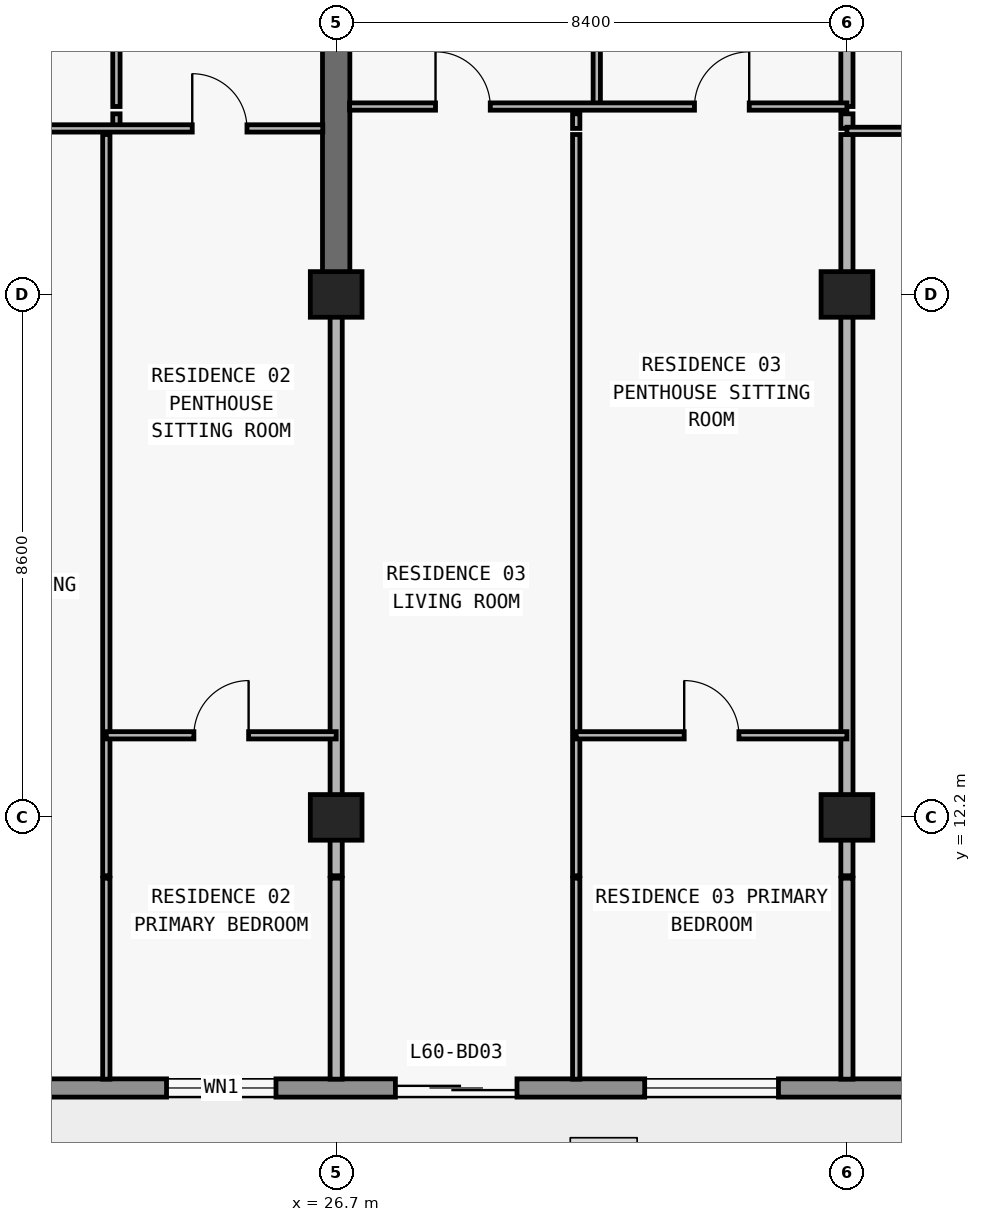
"""IFC4 building model, lengths in metres.
Left out: names, types, materials, properties, quantities, classifications, styles, units other than length and angle.
Written with IfcOpenShell. Run it as: python <this file> out.ifc"""

import sys

from ifc_helpers import new_model, si_unit, direction, frame, frame_2d, origin, origin_2d, place, context, subcontext, project, spatial, rectangle, extrude, element, fill, save


model = new_model("IFC4")
c1 = context("Model", 3, precision=1e-05, world=origin(), true_north=direction((0.0, 1.0)))
c2 = subcontext(c1, "Body", "Model", "MODEL_VIEW")
j1 = project(units=[si_unit("LENGTHUNIT", "METRE"), si_unit("PLANEANGLEUNIT", "RADIAN")], contexts=[c1])
p1 = place(None, origin())
s1 = spatial("IfcSite", under=j1, at=p1, CompositionType="ELEMENT")
p2 = place(p1, origin())
s2 = spatial("IfcBuilding", under=s1, at=p2, CompositionType="ELEMENT")
p3 = place(p2, frame((0.0, 0.0, 214.8)))
s3 = spatial("IfcBuildingStorey", under=s2, at=p3, CompositionType="ELEMENT", Elevation=214.8)
for number, where, z_axis, x_axis in (
    (1, (26.7, 12.2, 0.0), (0.0, 0.0, 1.0), (1.0, 0.0, 0.0)),
    (2, (35.1, 12.2, 0.0), (0.0, 0.0, 1.0), (1.0, 0.0, 0.0)),
    (3, (26.7, 20.8, 0.0), (0.0, 0.0, 1.0), (1.0, 0.0, 0.0)),
    (4, (35.1, 20.8, 0.0), (0.0, 0.0, 1.0), (1.0, 0.0, 0.0)),
):
    element("IfcColumn", number, at=place(p3, frame(where, z_axis=z_axis, x_axis=x_axis)), inside=s3, PredefinedType="COLUMN", context=c2, shape_type="SweptSolid", body=[
        extrude(rectangle(XDim=0.85, YDim=0.75, at=origin_2d()), origin(), (0.0, 0.0, 1.0), 3.05),
    ])
p4 = place(p3, frame((26.7, 20.8, 0.0), z_axis=(0.0, 0.0, 1.0), x_axis=(0.0, 1.0, 0.0)))
e5 = element("IfcWall", 5, at=p4, inside=s3, PredefinedType="SHEAR", context=c2, shape_type="SweptSolid", body=[
    extrude(rectangle(XDim=8.6, YDim=0.45, at=frame_2d((4.3, 0.0))), origin(), (0.0, 0.0, 1.0), 3.05),
])
p5 = place(p3, frame((67.7, 7.75, 0.0), z_axis=(0.0, 0.0, 1.0), x_axis=(-1.0, 0.0, 0.0)))
e6 = element("IfcWall", 6, at=p5, inside=s3, PredefinedType="STANDARD", context=c2, shape_type="SweptSolid", body=[
    extrude(rectangle(XDim=57.6, YDim=0.3, at=frame_2d((28.8, 0.0))), origin(), (0.0, 0.0, 1.0), 3.05),
])
p6 = place(p5, frame((54.673, 0.0, 0.0)))
e7 = element("IfcOpeningElement", 7, at=p6, cuts=e6, PredefinedType="OPENING", context=c2, shape_type="SweptSolid", body=[
    extrude(rectangle(XDim=2.0, YDim=2.3, at=frame_2d((1.0, 1.15))), frame((0.0, 0.16, 0.0), z_axis=(0.0, -1.0, 0.0), x_axis=(1.0, 0.0, 0.0)), (0.0, 0.0, 1.0), 0.32),
])
p7 = place(p5, frame((50.473, 0.0, 0.85)))
e8 = element("IfcOpeningElement", 8, at=p7, cuts=e6, PredefinedType="OPENING", context=c2, shape_type="SweptSolid", body=[
    extrude(rectangle(XDim=2.2, YDim=1.55, at=frame_2d((1.1, 0.775))), frame((0.0, 0.16, 0.0), z_axis=(0.0, -1.0, 0.0), x_axis=(1.0, 0.0, 0.0)), (0.0, 0.0, 1.0), 0.32),
])
p8 = place(p5, frame((46.09, 0.0, 0.0)))
e9 = element("IfcOpeningElement", 9, at=p8, cuts=e6, PredefinedType="OPENING", context=c2, shape_type="SweptSolid", body=[
    extrude(rectangle(XDim=2.0, YDim=2.3, at=frame_2d((1.0, 1.15))), frame((0.0, 0.16, 0.0), z_axis=(0.0, -1.0, 0.0), x_axis=(1.0, 0.0, 0.0)), (0.0, 0.0, 1.0), 0.32),
])
p9 = place(p5, frame((41.99, 0.0, 0.85)))
e10 = element("IfcOpeningElement", 10, at=p9, cuts=e6, PredefinedType="OPENING", context=c2, shape_type="SweptSolid", body=[
    extrude(rectangle(XDim=1.8, YDim=1.55, at=frame_2d((0.9, 0.775))), frame((0.0, 0.16, 0.0), z_axis=(0.0, -1.0, 0.0), x_axis=(1.0, 0.0, 0.0)), (0.0, 0.0, 1.0), 0.32),
])
p10 = place(p5, frame((38.026, 0.0, 0.0)))
e11 = element("IfcOpeningElement", 11, at=p10, cuts=e6, PredefinedType="OPENING", context=c2, shape_type="SweptSolid", body=[
    extrude(rectangle(XDim=2.0, YDim=2.3, at=frame_2d((1.0, 1.15))), frame((0.0, 0.16, 0.0), z_axis=(0.0, -1.0, 0.0), x_axis=(1.0, 0.0, 0.0)), (0.0, 0.0, 1.0), 0.32),
])
p11 = place(p5, frame((33.726, 0.0, 0.85)))
e12 = element("IfcOpeningElement", 12, at=p11, cuts=e6, PredefinedType="OPENING", context=c2, shape_type="SweptSolid", body=[
    extrude(rectangle(XDim=2.2, YDim=1.55, at=frame_2d((1.1, 0.775))), frame((0.0, 0.16, 0.0), z_axis=(0.0, -1.0, 0.0), x_axis=(1.0, 0.0, 0.0)), (0.0, 0.0, 1.0), 0.32),
])
p12 = place(p5, frame((29.51, 0.0, 0.0)))
e13 = element("IfcOpeningElement", 13, at=p12, cuts=e6, PredefinedType="OPENING", context=c2, shape_type="SweptSolid", body=[
    extrude(rectangle(XDim=2.0, YDim=2.3, at=frame_2d((1.0, 1.15))), frame((0.0, 0.16, 0.0), z_axis=(0.0, -1.0, 0.0), x_axis=(1.0, 0.0, 0.0)), (0.0, 0.0, 1.0), 0.32),
])
p13 = place(p5, frame((25.81, 0.0, 0.85)))
e14 = element("IfcOpeningElement", 14, at=p13, cuts=e6, PredefinedType="OPENING", context=c2, shape_type="SweptSolid", body=[
    extrude(rectangle(XDim=1.8, YDim=1.55, at=frame_2d((0.9, 0.775))), frame((0.0, 0.16, 0.0), z_axis=(0.0, -1.0, 0.0), x_axis=(1.0, 0.0, 0.0)), (0.0, 0.0, 1.0), 0.32),
])
p14 = place(p5, frame((22.026, 0.0, 0.0)))
e15 = element("IfcOpeningElement", 15, at=p14, cuts=e6, PredefinedType="OPENING", context=c2, shape_type="SweptSolid", body=[
    extrude(rectangle(XDim=2.0, YDim=2.3, at=frame_2d((1.0, 1.15))), frame((0.0, 0.16, 0.0), z_axis=(0.0, -1.0, 0.0), x_axis=(1.0, 0.0, 0.0)), (0.0, 0.0, 1.0), 0.32),
])
p15 = place(p5, frame((17.726, 0.0, 0.85)))
e16 = element("IfcOpeningElement", 16, at=p15, cuts=e6, PredefinedType="OPENING", context=c2, shape_type="SweptSolid", body=[
    extrude(rectangle(XDim=2.2, YDim=1.55, at=frame_2d((1.1, 0.775))), frame((0.0, 0.16, 0.0), z_axis=(0.0, -1.0, 0.0), x_axis=(1.0, 0.0, 0.0)), (0.0, 0.0, 1.0), 0.32),
])
p16 = place(p5, frame((13.29, 0.0, 0.0)))
e17 = element("IfcOpeningElement", 17, at=p16, cuts=e6, PredefinedType="OPENING", context=c2, shape_type="SweptSolid", body=[
    extrude(rectangle(XDim=2.0, YDim=2.3, at=frame_2d((1.0, 1.15))), frame((0.0, 0.16, 0.0), z_axis=(0.0, -1.0, 0.0), x_axis=(1.0, 0.0, 0.0)), (0.0, 0.0, 1.0), 0.32),
])
p17 = place(p5, frame((9.19, 0.0, 0.85)))
e18 = element("IfcOpeningElement", 18, at=p17, cuts=e6, PredefinedType="OPENING", context=c2, shape_type="SweptSolid", body=[
    extrude(rectangle(XDim=1.8, YDim=1.55, at=frame_2d((0.9, 0.775))), frame((0.0, 0.16, 0.0), z_axis=(0.0, -1.0, 0.0), x_axis=(1.0, 0.0, 0.0)), (0.0, 0.0, 1.0), 0.32),
])
p18 = place(p5, frame((5.273, 0.0, 0.0)))
e19 = element("IfcOpeningElement", 19, at=p18, cuts=e6, PredefinedType="OPENING", context=c2, shape_type="SweptSolid", body=[
    extrude(rectangle(XDim=2.0, YDim=2.3, at=frame_2d((1.0, 1.15))), frame((0.0, 0.16, 0.0), z_axis=(0.0, -1.0, 0.0), x_axis=(1.0, 0.0, 0.0)), (0.0, 0.0, 1.0), 0.32),
])
p19 = place(p5, frame((1.073, 0.0, 0.85)))
e20 = element("IfcOpeningElement", 20, at=p19, cuts=e6, PredefinedType="OPENING", context=c2, shape_type="SweptSolid", body=[
    extrude(rectangle(XDim=2.2, YDim=1.55, at=frame_2d((1.1, 0.775))), frame((0.0, 0.16, 0.0), z_axis=(0.0, -1.0, 0.0), x_axis=(1.0, 0.0, 0.0)), (0.0, 0.0, 1.0), 0.32),
])
p20 = place(p3, frame((22.92, 7.895, 0.0), z_axis=(0.0, 0.0, 1.0), x_axis=(0.0, 1.0, 0.0)))
e21 = element("IfcWall", 21, at=p20, inside=s3, PredefinedType="PARTITIONING", context=c2, shape_type="SweptSolid", body=[
    extrude(rectangle(XDim=3.305, YDim=0.12, at=frame_2d((1.652, 0.0))), origin(), (0.0, 0.0, 1.0), 3.05),
])
p21 = place(p3, frame((22.92, 11.24, 0.0), z_axis=(0.0, 0.0, 1.0), x_axis=(0.0, 1.0, 0.0)))
e22 = element("IfcWall", 22, at=p21, inside=s3, PredefinedType="PARTITIONING", context=c2, shape_type="SweptSolid", body=[
    extrude(rectangle(XDim=12.19, YDim=0.12, at=frame_2d((6.095, 0.0))), origin(), (0.0, 0.0, 1.0), 3.05),
])
p22 = place(p3, frame((23.086, 23.53, 0.0), z_axis=(0.0, 0.0, 1.0), x_axis=(0.0, 1.0, 0.0)))
e23 = element("IfcWall", 23, at=p22, inside=s3, PredefinedType="PARTITIONING", context=c2, shape_type="SweptSolid", body=[
    extrude(rectangle(XDim=0.24, YDim=0.12, at=frame_2d((0.12, 0.0))), origin(), (0.0, 0.0, 1.0), 3.05),
])
p23 = place(p3, frame((23.086, 23.89, 0.0), z_axis=(0.0, 0.0, 1.0), x_axis=(0.0, 1.0, 0.0)))
e24 = element("IfcWall", 24, at=p23, inside=s3, PredefinedType="PARTITIONING", context=c2, shape_type="SweptSolid", body=[
    extrude(rectangle(XDim=4.69, YDim=0.12, at=frame_2d((2.345, 0.0))), origin(), (0.0, 0.0, 1.0), 3.05),
])
p24 = place(p23, frame((1.895, 0.0, 0.0)))
e25 = element("IfcOpeningElement", 25, at=p24, cuts=e24, PredefinedType="OPENING", context=c2, shape_type="SweptSolid", body=[
    extrude(rectangle(XDim=0.9, YDim=2.15, at=frame_2d((0.45, 1.075))), frame((0.0, 0.07, 0.0), z_axis=(0.0, -1.0, 0.0), x_axis=(1.0, 0.0, 0.0)), (0.0, 0.0, 1.0), 0.14),
])
p25 = place(p3, frame((26.7, 7.895, 0.0), z_axis=(0.0, 0.0, 1.0), x_axis=(0.0, 1.0, 0.0)))
e26 = element("IfcWall", 26, at=p25, inside=s3, PredefinedType="PARTITIONING", context=c2, shape_type="SweptSolid", body=[
    extrude(rectangle(XDim=3.305, YDim=0.2, at=frame_2d((1.652, 0.0))), origin(), (0.0, 0.0, 1.0), 3.05),
])
p26 = place(p3, frame((26.7, 11.24, 0.0), z_axis=(0.0, 0.0, 1.0), x_axis=(0.0, 1.0, 0.0)))
e27 = element("IfcWall", 27, at=p26, inside=s3, PredefinedType="PARTITIONING", context=c2, shape_type="SweptSolid", body=[
    extrude(rectangle(XDim=9.555, YDim=0.2, at=frame_2d((4.777, 0.0))), origin(), (0.0, 0.0, 1.0), 2.263),
])
p27 = place(p3, frame((30.648, 7.895, 0.0), z_axis=(0.0, 0.0, 1.0), x_axis=(0.0, 1.0, 0.0)))
e28 = element("IfcWall", 28, at=p27, inside=s3, PredefinedType="PARTITIONING", context=c2, shape_type="SweptSolid", body=[
    extrude(rectangle(XDim=3.305, YDim=0.12, at=frame_2d((1.652, 0.0))), origin(), (0.0, 0.0, 1.0), 3.05),
])
p28 = place(p3, frame((30.648, 11.24, 0.0), z_axis=(0.0, 0.0, 1.0), x_axis=(0.0, 1.0, 0.0)))
e29 = element("IfcWall", 29, at=p28, inside=s3, PredefinedType="PARTITIONING", context=c2, shape_type="SweptSolid", body=[
    extrude(rectangle(XDim=12.19, YDim=0.12, at=frame_2d((6.095, 0.0))), origin(), (0.0, 0.0, 1.0), 3.05),
])
p29 = place(p3, frame((30.648, 23.53, 0.0), z_axis=(0.0, 0.0, 1.0), x_axis=(0.0, 1.0, 0.0)))
e30 = element("IfcWall", 30, at=p29, inside=s3, PredefinedType="PARTITIONING", context=c2, shape_type="SweptSolid", body=[
    extrude(rectangle(XDim=0.24, YDim=0.12, at=frame_2d((0.12, 0.0))), origin(), (0.0, 0.0, 1.0), 3.05),
])
p30 = place(p3, frame((30.986, 23.89, 0.0), z_axis=(0.0, 0.0, 1.0), x_axis=(0.0, 1.0, 0.0)))
e31 = element("IfcWall", 31, at=p30, inside=s3, PredefinedType="PARTITIONING", context=c2, shape_type="SweptSolid", body=[
    extrude(rectangle(XDim=4.69, YDim=0.12, at=frame_2d((2.345, 0.0))), origin(), (0.0, 0.0, 1.0), 3.05),
])
p31 = place(p30, frame((1.895, 0.0, 0.0)))
e32 = element("IfcOpeningElement", 32, at=p31, cuts=e31, PredefinedType="OPENING", context=c2, shape_type="SweptSolid", body=[
    extrude(rectangle(XDim=0.9, YDim=2.15, at=frame_2d((0.45, 1.075))), frame((0.0, 0.07, 0.0), z_axis=(0.0, -1.0, 0.0), x_axis=(1.0, 0.0, 0.0)), (0.0, 0.0, 1.0), 0.14),
])
p32 = place(p3, frame((35.1, 7.895, 0.0), z_axis=(0.0, 0.0, 1.0), x_axis=(0.0, 1.0, 0.0)))
e33 = element("IfcWall", 33, at=p32, inside=s3, PredefinedType="PARTITIONING", context=c2, shape_type="SweptSolid", body=[
    extrude(rectangle(XDim=3.305, YDim=0.2, at=frame_2d((1.652, 0.0))), origin(), (0.0, 0.0, 1.0), 3.05),
])
p33 = place(p3, frame((35.1, 11.24, 0.0), z_axis=(0.0, 0.0, 1.0), x_axis=(0.0, 1.0, 0.0)))
e34 = element("IfcWall", 34, at=p33, inside=s3, PredefinedType="PARTITIONING", context=c2, shape_type="SweptSolid", body=[
    extrude(rectangle(XDim=12.19, YDim=0.2, at=frame_2d((6.095, 0.0))), origin(), (0.0, 0.0, 1.0), 2.263),
])
p34 = place(p3, frame((35.1, 23.53, 0.0), z_axis=(0.0, 0.0, 1.0), x_axis=(0.0, 1.0, 0.0)))
e35 = element("IfcWall", 35, at=p34, inside=s3, PredefinedType="PARTITIONING", context=c2, shape_type="SweptSolid", body=[
    extrude(rectangle(XDim=0.24, YDim=0.2, at=frame_2d((0.12, 0.0))), origin(), (0.0, 0.0, 1.0), 2.263),
])
p35 = place(p3, frame((35.1, 23.89, 0.0), z_axis=(0.0, 0.0, 1.0), x_axis=(0.0, 1.0, 0.0)))
e36 = element("IfcWall", 36, at=p35, inside=s3, PredefinedType="PARTITIONING", context=c2, shape_type="SweptSolid", body=[
    extrude(rectangle(XDim=4.69, YDim=0.2, at=frame_2d((2.345, 0.0))), origin(), (0.0, 0.0, 1.0), 2.263),
])
p36 = place(p3, frame((22.92, 13.55, 0.0), z_axis=(0.0, 0.0, 1.0), x_axis=(1.0, 0.0, 0.0)))
e37 = element("IfcWall", 37, at=p36, inside=s3, PredefinedType="PARTITIONING", context=c2, shape_type="SweptSolid", body=[
    extrude(rectangle(XDim=3.78, YDim=0.12, at=frame_2d((1.89, 0.0))), origin(), (0.0, 0.0, 1.0), 3.05),
])
p37 = place(p36, frame((1.44, 0.0, 0.0)))
e38 = element("IfcOpeningElement", 38, at=p37, cuts=e37, PredefinedType="OPENING", context=c2, shape_type="SweptSolid", body=[
    extrude(rectangle(XDim=0.9, YDim=2.15, at=frame_2d((0.45, 1.075))), frame((0.0, 0.07, 0.0), z_axis=(0.0, -1.0, 0.0), x_axis=(1.0, 0.0, 0.0)), (0.0, 0.0, 1.0), 0.14),
])
p38 = place(p3, frame((30.648, 13.55, 0.0), z_axis=(0.0, 0.0, 1.0), x_axis=(1.0, 0.0, 0.0)))
e39 = element("IfcWall", 39, at=p38, inside=s3, PredefinedType="PARTITIONING", context=c2, shape_type="SweptSolid", body=[
    extrude(rectangle(XDim=4.452, YDim=0.12, at=frame_2d((2.226, 0.0))), origin(), (0.0, 0.0, 1.0), 3.05),
])
p39 = place(p38, frame((1.776, 0.0, 0.0)))
e40 = element("IfcOpeningElement", 40, at=p39, cuts=e39, PredefinedType="OPENING", context=c2, shape_type="SweptSolid", body=[
    extrude(rectangle(XDim=0.9, YDim=2.15, at=frame_2d((0.45, 1.075))), frame((0.0, 0.07, 0.0), z_axis=(0.0, -1.0, 0.0), x_axis=(1.0, 0.0, 0.0)), (0.0, 0.0, 1.0), 0.14),
])
p40 = place(p3, frame((35.1, 23.49, 0.0), z_axis=(0.0, 0.0, 1.0), x_axis=(1.0, 0.0, 0.0)))
e41 = element("IfcWall", 41, at=p40, inside=s3, PredefinedType="PARTITIONING", context=c2, shape_type="SweptSolid", body=[
    extrude(rectangle(XDim=4.104, YDim=0.12, at=frame_2d((2.052, 0.0))), origin(), (0.0, 0.0, 1.0), 3.05),
])
p41 = place(p40, frame((1.602, 0.0, 0.0)))
e42 = element("IfcOpeningElement", 42, at=p41, cuts=e41, PredefinedType="OPENING", context=c2, shape_type="SweptSolid", body=[
    extrude(rectangle(XDim=0.9, YDim=2.15, at=frame_2d((0.45, 1.075))), frame((0.0, 0.07, 0.0), z_axis=(0.0, -1.0, 0.0), x_axis=(1.0, 0.0, 0.0)), (0.0, 0.0, 1.0), 0.14),
])
p42 = place(p3, frame((18.3, 23.53, 0.0), z_axis=(0.0, 0.0, 1.0), x_axis=(1.0, 0.0, 0.0)))
e43 = element("IfcWall", 43, at=p42, inside=s3, PredefinedType="PARTITIONING", context=c2, shape_type="SweptSolid", body=[
    extrude(rectangle(XDim=8.18, YDim=0.12, at=frame_2d((4.09, 0.0))), origin(), (0.0, 0.0, 1.0), 3.05),
])
p43 = place(p42, frame((1.86, 0.0, 0.0)))
e44 = element("IfcOpeningElement", 44, at=p43, cuts=e43, PredefinedType="OPENING", context=c2, shape_type="SweptSolid", body=[
    extrude(rectangle(XDim=0.9, YDim=2.15, at=frame_2d((0.45, 1.075))), frame((0.0, 0.07, 0.0), z_axis=(0.0, -1.0, 0.0), x_axis=(1.0, 0.0, 0.0)), (0.0, 0.0, 1.0), 0.14),
])
p44 = place(p42, frame((6.033, 0.0, 0.0)))
e45 = element("IfcOpeningElement", 45, at=p44, cuts=e43, PredefinedType="OPENING", context=c2, shape_type="SweptSolid", body=[
    extrude(rectangle(XDim=0.9, YDim=2.15, at=frame_2d((0.45, 1.075))), frame((0.0, 0.07, 0.0), z_axis=(0.0, -1.0, 0.0), x_axis=(1.0, 0.0, 0.0)), (0.0, 0.0, 1.0), 0.14),
])
p45 = place(p3, frame((26.92, 23.89, 0.0), z_axis=(0.0, 0.0, 1.0), x_axis=(1.0, 0.0, 0.0)))
e46 = element("IfcWall", 46, at=p45, inside=s3, PredefinedType="PARTITIONING", context=c2, shape_type="SweptSolid", body=[
    extrude(rectangle(XDim=8.18, YDim=0.12, at=frame_2d((4.09, 0.0))), origin(), (0.0, 0.0, 1.0), 3.05),
])
p46 = place(p45, frame((1.414, 0.0, 0.0)))
e47 = element("IfcOpeningElement", 47, at=p46, cuts=e46, PredefinedType="OPENING", context=c2, shape_type="SweptSolid", body=[
    extrude(rectangle(XDim=0.9, YDim=2.15, at=frame_2d((0.45, 1.075))), frame((0.0, 0.07, 0.0), z_axis=(0.0, -1.0, 0.0), x_axis=(1.0, 0.0, 0.0)), (0.0, 0.0, 1.0), 0.14),
])
p47 = place(p45, frame((5.673, 0.0, 0.0)))
e48 = element("IfcOpeningElement", 48, at=p47, cuts=e46, PredefinedType="OPENING", context=c2, shape_type="SweptSolid", body=[
    extrude(rectangle(XDim=0.9, YDim=2.15, at=frame_2d((0.45, 1.075))), frame((0.0, 0.07, 0.0), z_axis=(0.0, -1.0, 0.0), x_axis=(1.0, 0.0, 0.0)), (0.0, 0.0, 1.0), 0.14),
])
p48 = place(p9, origin())
e49 = element("IfcWindow", 49, at=p48, inside=s3, PartitioningType="SINGLE_PANEL", PredefinedType="WINDOW", context=c2, shape_type="SweptSolid", body=[
    extrude(rectangle(XDim=1.8, YDim=1.55, at=frame_2d((0.9, 0.775))), frame((0.0, 0.03, 0.0), z_axis=(0.0, -1.0, 0.0), x_axis=(1.0, 0.0, 0.0)), (0.0, 0.0, 1.0), 0.06),
])
fill(e10, e49)
p49 = place(p10, origin())
e50 = element("IfcDoor", 50, at=p49, inside=s3, OperationType="DOUBLE_DOOR_SLIDING", PredefinedType="DOOR", context=c2, shape_type="SweptSolid", body=[
    extrude(rectangle(XDim=2.0, YDim=2.3, at=frame_2d((1.0, 1.15))), frame((0.0, 0.025, 0.0), z_axis=(0.0, -1.0, 0.0), x_axis=(1.0, 0.0, 0.0)), (0.0, 0.0, 1.0), 0.05),
])
fill(e11, e50)
p50 = place(p11, origin())
e51 = element("IfcWindow", 51, at=p50, inside=s3, PartitioningType="SINGLE_PANEL", PredefinedType="WINDOW", context=c2, shape_type="SweptSolid", body=[
    extrude(rectangle(XDim=2.2, YDim=1.55, at=frame_2d((1.1, 0.775))), frame((0.0, 0.03, 0.0), z_axis=(0.0, -1.0, 0.0), x_axis=(1.0, 0.0, 0.0)), (0.0, 0.0, 1.0), 0.06),
])
fill(e12, e51)
p51 = place(p44, origin())
e52 = element("IfcDoor", 52, at=p51, inside=s3, OperationType="SINGLE_SWING_LEFT", PredefinedType="DOOR", context=c2, shape_type="SweptSolid", body=[
    extrude(rectangle(XDim=0.9, YDim=2.15, at=frame_2d((0.45, 1.075))), frame((0.0, 0.025, 0.0), z_axis=(0.0, -1.0, 0.0), x_axis=(1.0, 0.0, 0.0)), (0.0, 0.0, 1.0), 0.05),
])
fill(e45, e52)
p52 = place(p37, origin())
e53 = element("IfcDoor", 53, at=p52, inside=s3, OperationType="SINGLE_SWING_RIGHT", PredefinedType="DOOR", context=c2, shape_type="SweptSolid", body=[
    extrude(rectangle(XDim=0.9, YDim=2.15, at=frame_2d((0.45, 1.075))), frame((0.0, 0.025, 0.0), z_axis=(0.0, -1.0, 0.0), x_axis=(1.0, 0.0, 0.0)), (0.0, 0.0, 1.0), 0.05),
])
fill(e38, e53)
p53 = place(p46, origin())
e54 = element("IfcDoor", 54, at=p53, inside=s3, OperationType="SINGLE_SWING_LEFT", PredefinedType="DOOR", context=c2, shape_type="SweptSolid", body=[
    extrude(rectangle(XDim=0.9, YDim=2.15, at=frame_2d((0.45, 1.075))), frame((0.0, 0.025, 0.0), z_axis=(0.0, -1.0, 0.0), x_axis=(1.0, 0.0, 0.0)), (0.0, 0.0, 1.0), 0.05),
])
fill(e47, e54)
p54 = place(p47, origin())
e55 = element("IfcDoor", 55, at=p54, inside=s3, OperationType="SINGLE_SWING_RIGHT", PredefinedType="DOOR", context=c2, shape_type="SweptSolid", body=[
    extrude(rectangle(XDim=0.9, YDim=2.15, at=frame_2d((0.45, 1.075))), frame((0.0, 0.025, 0.0), z_axis=(0.0, -1.0, 0.0), x_axis=(1.0, 0.0, 0.0)), (0.0, 0.0, 1.0), 0.05),
])
fill(e48, e55)
p55 = place(p39, origin())
e56 = element("IfcDoor", 56, at=p55, inside=s3, OperationType="SINGLE_SWING_LEFT", PredefinedType="DOOR", context=c2, shape_type="SweptSolid", body=[
    extrude(rectangle(XDim=0.9, YDim=2.15, at=frame_2d((0.45, 1.075))), frame((0.0, 0.025, 0.0), z_axis=(0.0, -1.0, 0.0), x_axis=(1.0, 0.0, 0.0)), (0.0, 0.0, 1.0), 0.05),
])
fill(e40, e56)
save(model, sys.argv[1])
